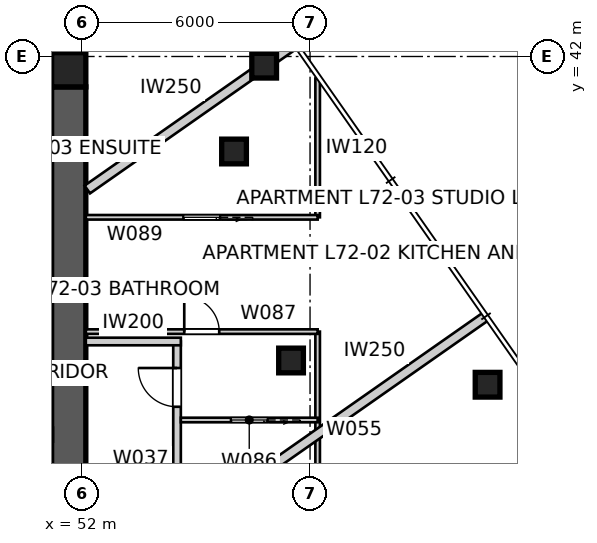
"""IFC4 building model, lengths in metres.
Left out: names, types, materials, properties, quantities, classifications, styles, units other than length and angle.
Written with IfcOpenShell. Run it as: python <this file> out.ifc"""

import sys

from ifc_helpers import new_model, si_unit, direction, frame, frame_2d, origin, origin_2d, place, context, subcontext, project, spatial, polyline, rectangle, outline, extrude, element, fill, save


model = new_model("IFC4")
c1 = context("Model", 3, precision=1e-05, world=origin(), true_north=direction((0.0, 1.0)))
c2 = subcontext(c1, "Body", "Model", "MODEL_VIEW")
j1 = project(units=[si_unit("LENGTHUNIT", "METRE"), si_unit("PLANEANGLEUNIT", "RADIAN")], contexts=[c1])
p1 = place(None, origin())
s1 = spatial("IfcSite", under=j1, at=p1, CompositionType="ELEMENT")
p2 = place(p1, origin())
s2 = spatial("IfcBuilding", under=s1, at=p2, CompositionType="ELEMENT")
p3 = place(p2, frame((0.0, 0.0, 260.8)))
s3 = spatial("IfcBuildingStorey", under=s2, at=p3, CompositionType="ELEMENT", Elevation=260.8)
p4 = place(p3, frame((28.8, 41.65, 0.0), z_axis=(0.0, 0.0, 1.0), x_axis=(1.0, 0.0, 0.0)))
e1 = element("IfcWall", 1, at=p4, inside=s3, PredefinedType="SHEAR", context=c2, shape_type="SweptSolid", body=[
    extrude(outline(polyline([(0.0, -0.45), (22.4, -0.45), (22.4, -0.025), (22.85, -0.025), (22.85, 0.025), (22.4, 0.025), (22.4, 0.45), (0.0, 0.45), (0.0, 0.025), (-0.45, 0.025), (-0.45, -0.025), (0.0, -0.025), (0.0, -0.45)])), origin(), (0.0, 0.0, 1.0), 3.4),
])
p5 = place(p3, frame((51.65, 18.8, 0.0), z_axis=(0.0, 0.0, 1.0), x_axis=(0.0, 1.0, 0.0)))
e2 = element("IfcWall", 2, at=p5, inside=s3, PredefinedType="SHEAR", context=c2, shape_type="SweptSolid", body=[
    extrude(outline(polyline([(0.0, -0.45), (22.4, -0.45), (22.4, -0.025), (22.85, -0.025), (22.85, 0.025), (22.4, 0.025), (22.4, 0.45), (0.0, 0.45), (0.0, 0.025), (-0.45, 0.025), (-0.45, -0.025), (0.0, -0.025), (0.0, -0.45)])), origin(), (0.0, 0.0, 1.0), 3.4),
])
p6 = place(p5, frame((11.14, 0.0, 0.0)))
e3 = element("IfcOpeningElement", 3, at=p6, cuts=e2, PredefinedType="OPENING", context=c2, shape_type="SweptSolid", body=[
    extrude(rectangle(XDim=1.02, YDim=2.4, at=frame_2d((0.51, 1.2))), frame((0.0, 0.46, 0.0), z_axis=(0.0, -1.0, 0.0), x_axis=(1.0, 0.0, 0.0)), (0.0, 0.0, 1.0), 0.92),
])
p7 = place(p3, frame((51.65, 41.65, 0.0), z_axis=(0.0, 0.0, 1.0), x_axis=(1.0, 0.0, 0.0)))
e4 = element("IfcColumn", 4, at=p7, inside=s3, PredefinedType="COLUMN", context=c2, shape_type="SweptSolid", body=[
    extrude(rectangle(XDim=0.9, YDim=0.9, at=origin_2d()), origin(), (0.0, 0.0, 1.0), 3.4),
])
for number, where, z_axis, x_axis in (
    (5, (62.672, 33.362, 0.0), (0.0, 0.0, 1.0), (1.0, 0.0, 0.0)),
    (6, (56.793, 41.758, 0.0), (0.0, 0.0, 1.0), (1.0, 0.0, 0.0)),
    (7, (57.5, 34.0, 0.0), (0.0, 0.0, 1.0), (1.0, 0.0, 0.0)),
    (8, (56.0, 39.5, 0.0), (0.0, 0.0, 1.0), (1.0, 0.0, 0.0)),
):
    element("IfcColumn", number, at=place(p3, frame(where, z_axis=z_axis, x_axis=x_axis)), inside=s3, PredefinedType="COLUMN", context=c2, shape_type="SweptSolid", body=[
        extrude(rectangle(XDim=0.65, YDim=0.65, at=origin_2d()), origin(), (0.0, 0.0, 1.0), 3.4),
    ])
p8 = place(p3, frame((54.5, 25.5, 0.0), z_axis=(0.0, 0.0, 1.0), x_axis=(0.0, 1.0, 0.0)))
e9 = element("IfcWall", 9, at=p8, inside=s3, PredefinedType="PARTITIONING", context=c2, shape_type="SweptSolid", body=[
    extrude(rectangle(XDim=9.0, YDim=0.2, at=frame_2d((4.5, 0.0))), origin(), (0.0, 0.0, 1.0), 3.25),
])
p9 = place(p8, frame((1.643, 0.0, 0.0)))
e10 = element("IfcOpeningElement", 10, at=p9, cuts=e9, PredefinedType="OPENING", context=c2, shape_type="SweptSolid", body=[
    extrude(rectangle(XDim=1.02, YDim=2.34, at=frame_2d((0.51, 1.17))), frame((0.0, 0.11, 0.0), z_axis=(0.0, -1.0, 0.0), x_axis=(1.0, 0.0, 0.0)), (0.0, 0.0, 1.0), 0.22),
])
p10 = place(p8, frame((7.282, 0.0, 0.0)))
e11 = element("IfcOpeningElement", 11, at=p10, cuts=e9, PredefinedType="OPENING", context=c2, shape_type="SweptSolid", body=[
    extrude(rectangle(XDim=1.02, YDim=2.34, at=frame_2d((0.51, 1.17))), frame((0.0, 0.11, 0.0), z_axis=(0.0, -1.0, 0.0), x_axis=(1.0, 0.0, 0.0)), (0.0, 0.0, 1.0), 0.22),
])
p11 = place(p3, frame((52.1, 34.5, 0.0), z_axis=(0.0, 0.0, 1.0), x_axis=(1.0, 0.0, 0.0)))
e12 = element("IfcWall", 12, at=p11, inside=s3, PredefinedType="PARTITIONING", context=c2, shape_type="SweptSolid", body=[
    extrude(rectangle(XDim=2.5, YDim=0.2, at=frame_2d((1.25, 0.0))), origin(), (0.0, 0.0, 1.0), 3.25),
])
p12 = place(p3, frame((57.612, 42.332, 0.0), z_axis=(0.0, 0.0, 1.0), x_axis=(-0.819161528122, -0.573562891796, 0.0)))
e13 = element("IfcWall", 13, at=p12, inside=s3, PredefinedType="PARTITIONING", context=c2, shape_type="SweptSolid", body=[
    extrude(rectangle(XDim=6.681, YDim=0.25, at=frame_2d((3.341, 0.0))), origin(), (0.0, 0.0, 1.0), 3.25),
])
p13 = place(p3, frame((62.631, 35.164, 0.0), z_axis=(0.0, 0.0, 1.0), x_axis=(-0.81915902312, -0.573566469418, 0.0)))
e14 = element("IfcWall", 14, at=p13, inside=s3, PredefinedType="PARTITIONING", context=c2, shape_type="SweptSolid", body=[
    extrude(rectangle(XDim=9.756, YDim=0.25, at=frame_2d((4.878, 0.0))), origin(), (0.0, 0.0, 1.0), 3.25),
])
p14 = place(p3, frame((58.2, 34.76, 0.0), z_axis=(0.0, 0.0, 1.0), x_axis=(0.0, -1.0, 0.0)))
e15 = element("IfcWall", 15, at=p14, inside=s3, PredefinedType="PARTITIONING", context=c2, shape_type="SweptSolid", body=[
    extrude(rectangle(XDim=12.964, YDim=0.12, at=frame_2d((6.482, 0.0))), origin(), (0.0, 0.0, 1.0), 3.25),
])
p15 = place(p14, frame((5.162, 0.0, 0.0)))
e16 = element("IfcOpeningElement", 16, at=p15, cuts=e15, PredefinedType="OPENING", context=c2, shape_type="SweptSolid", body=[
    extrude(rectangle(XDim=0.92, YDim=2.34, at=frame_2d((0.46, 1.17))), frame((0.0, 0.07, 0.0), z_axis=(0.0, -1.0, 0.0), x_axis=(1.0, 0.0, 0.0)), (0.0, 0.0, 1.0), 0.14),
])
p16 = place(p14, frame((10.6, 0.0, 0.0)))
e17 = element("IfcOpeningElement", 17, at=p16, cuts=e15, PredefinedType="OPENING", context=c2, shape_type="SweptSolid", body=[
    extrude(rectangle(XDim=0.92, YDim=2.34, at=frame_2d((0.46, 1.17))), frame((0.0, 0.07, 0.0), z_axis=(0.0, -1.0, 0.0), x_axis=(1.0, 0.0, 0.0)), (0.0, 0.0, 1.0), 0.14),
])
p17 = place(p3, frame((58.2, 32.434, 0.0), z_axis=(0.0, 0.0, 1.0), x_axis=(-1.0, 0.0, 0.0)))
e18 = element("IfcWall", 18, at=p17, inside=s3, PredefinedType="PARTITIONING", context=c2, shape_type="SweptSolid", body=[
    extrude(rectangle(XDim=3.6, YDim=0.12, at=frame_2d((1.8, 0.0))), origin(), (0.0, 0.0, 1.0), 3.25),
])
p18 = place(p17, frame((1.32, 0.0, 0.0)))
e19 = element("IfcOpeningElement", 19, at=p18, cuts=e18, PredefinedType="OPENING", context=c2, shape_type="SweptSolid", body=[
    extrude(rectangle(XDim=0.96, YDim=2.1, at=frame_2d((0.48, 1.05))), frame((0.0, 0.07, 0.0), z_axis=(0.0, -1.0, 0.0), x_axis=(1.0, 0.0, 0.0)), (0.0, 0.0, 1.0), 0.14),
])
p19 = place(p3, frame((52.1, 34.76, 0.0), z_axis=(0.0, 0.0, 1.0), x_axis=(1.0, 0.0, 0.0)))
e20 = element("IfcWall", 20, at=p19, inside=s3, PredefinedType="PARTITIONING", context=c2, shape_type="SweptSolid", body=[
    extrude(rectangle(XDim=6.1, YDim=0.12, at=frame_2d((3.05, 0.0))), origin(), (0.0, 0.0, 1.0), 3.25),
])
p20 = place(p19, frame((2.59, 0.0, 0.0)))
e21 = element("IfcOpeningElement", 21, at=p20, cuts=e20, PredefinedType="OPENING", context=c2, shape_type="SweptSolid", body=[
    extrude(rectangle(XDim=0.92, YDim=2.34, at=frame_2d((0.46, 1.17))), frame((0.0, 0.07, 0.0), z_axis=(0.0, -1.0, 0.0), x_axis=(1.0, 0.0, 0.0)), (0.0, 0.0, 1.0), 0.14),
])
p21 = place(p3, frame((58.2, 41.422, 0.0), z_axis=(0.0, 0.0, 1.0), x_axis=(0.0, -1.0, 0.0)))
e22 = element("IfcWall", 22, at=p21, inside=s3, PredefinedType="PARTITIONING", context=c2, shape_type="SweptSolid", body=[
    extrude(rectangle(XDim=3.654, YDim=0.12, at=frame_2d((1.827, 0.0))), origin(), (0.0, 0.0, 1.0), 3.25),
])
p22 = place(p3, frame((58.2, 37.768, 0.0), z_axis=(0.0, 0.0, 1.0), x_axis=(-1.0, 0.0, 0.0)))
e23 = element("IfcWall", 23, at=p22, inside=s3, PredefinedType="PARTITIONING", context=c2, shape_type="SweptSolid", body=[
    extrude(rectangle(XDim=6.1, YDim=0.12, at=frame_2d((3.05, 0.0))), origin(), (0.0, 0.0, 1.0), 3.25),
])
p23 = place(p22, frame((2.57, 0.0, 0.0)))
e24 = element("IfcOpeningElement", 24, at=p23, cuts=e23, PredefinedType="OPENING", context=c2, shape_type="SweptSolid", body=[
    extrude(rectangle(XDim=0.96, YDim=2.1, at=frame_2d((0.48, 1.05))), frame((0.0, 0.07, 0.0), z_axis=(0.0, -1.0, 0.0), x_axis=(1.0, 0.0, 0.0)), (0.0, 0.0, 1.0), 0.14),
])
p24 = place(p3, frame((55.271, 45.605, 0.0), z_axis=(0.0, 0.0, 1.0), x_axis=(-0.819158711158, -0.573566914958, 0.0)))
e25 = element("IfcWall", 25, at=p24, inside=s3, PredefinedType="SOLIDWALL", context=c2, shape_type="SweptSolid", body=[
    extrude(rectangle(XDim=6.111, YDim=0.15, at=frame_2d((3.055, 0.0))), origin(), (0.0, 0.0, 1.0), 3.25),
])
p25 = place(p24, frame((2.575, 0.0, 0.0)))
e26 = element("IfcOpeningElement", 26, at=p25, cuts=e25, PredefinedType="OPENING", context=c2, shape_type="SweptSolid", body=[
    extrude(rectangle(XDim=0.92, YDim=2.34, at=frame_2d((0.46, 1.17))), frame((0.0, 0.085, 0.0), z_axis=(0.0, -1.0, 0.0), x_axis=(1.0, 0.0, 0.0)), (0.0, 0.0, 1.0), 0.17),
])
p26 = place(p10, origin())
e27 = element("IfcDoor", 27, at=p26, inside=s3, OperationType="SINGLE_SWING_RIGHT", PredefinedType="DOOR", context=c2, shape_type="SweptSolid", body=[
    extrude(rectangle(XDim=1.02, YDim=2.34, at=frame_2d((0.51, 1.17))), frame((0.0, 0.025, 0.0), z_axis=(0.0, -1.0, 0.0), x_axis=(1.0, 0.0, 0.0)), (0.0, 0.0, 1.0), 0.05),
])
fill(e11, e27)
p27 = place(p20, origin())
e28 = element("IfcDoor", 28, at=p27, inside=s3, OperationType="SINGLE_SWING_LEFT", PredefinedType="DOOR", context=c2, shape_type="SweptSolid", body=[
    extrude(rectangle(XDim=0.92, YDim=2.34, at=frame_2d((0.46, 1.17))), frame((0.0, 0.025, 0.0), z_axis=(0.0, -1.0, 0.0), x_axis=(1.0, 0.0, 0.0)), (0.0, 0.0, 1.0), 0.05),
])
fill(e21, e28)
p28 = place(p18, origin())
e29 = element("IfcDoor", 29, at=p28, inside=s3, OperationType="SLIDING_TO_LEFT", PredefinedType="DOOR", context=c2, shape_type="SweptSolid", body=[
    extrude(rectangle(XDim=0.96, YDim=2.1, at=frame_2d((0.48, 1.05))), frame((0.0, 0.025, 0.0), z_axis=(0.0, -1.0, 0.0), x_axis=(1.0, 0.0, 0.0)), (0.0, 0.0, 1.0), 0.05),
])
fill(e19, e29)
p29 = place(p23, origin())
e30 = element("IfcDoor", 30, at=p29, inside=s3, OperationType="SLIDING_TO_LEFT", PredefinedType="DOOR", context=c2, shape_type="SweptSolid", body=[
    extrude(rectangle(XDim=0.96, YDim=2.1, at=frame_2d((0.48, 1.05))), frame((0.0, 0.025, 0.0), z_axis=(0.0, -1.0, 0.0), x_axis=(1.0, 0.0, 0.0)), (0.0, 0.0, 1.0), 0.05),
])
fill(e24, e30)
save(model, sys.argv[1])
